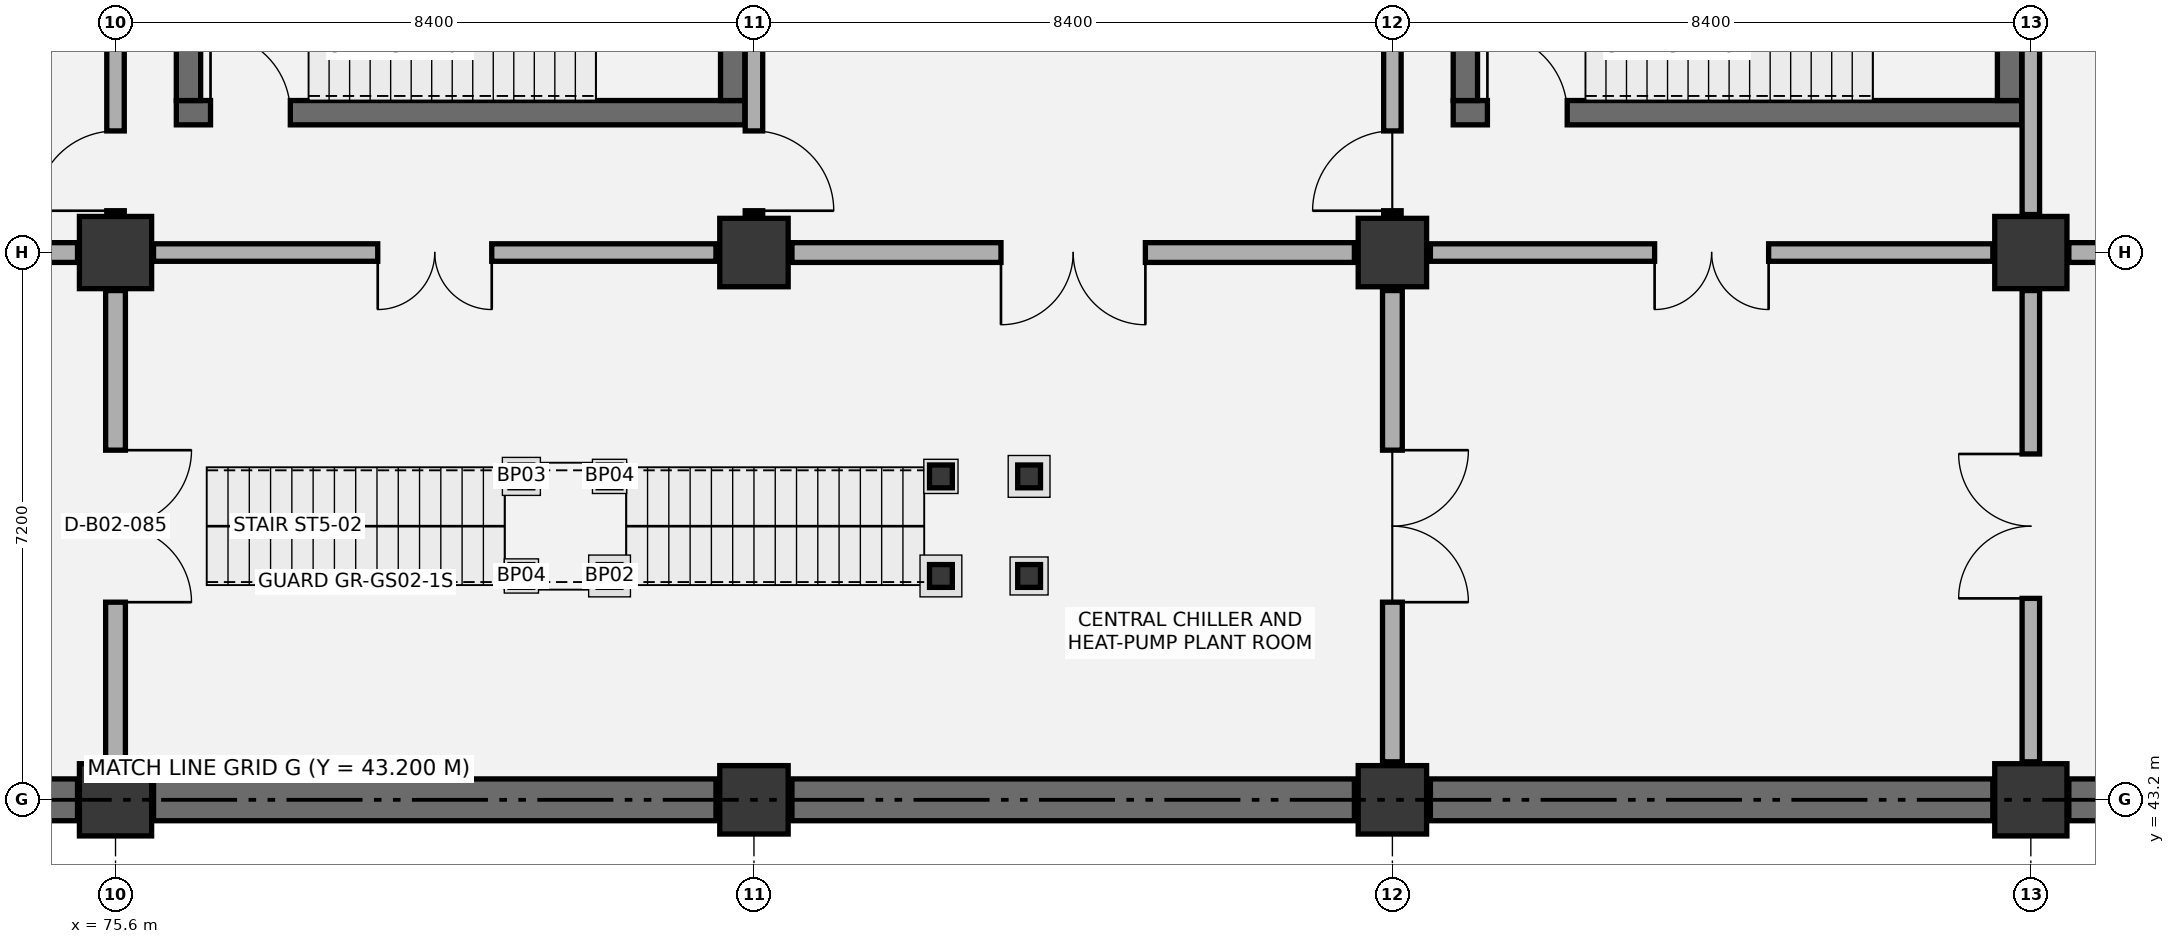
"""IFC4 building model, lengths in metres.
Left out: names, types, materials, properties, quantities, classifications, styles, units other than length and angle.
Written with IfcOpenShell. Run it as: python <this file> out.ifc"""

import sys

from ifc_helpers import new_model, si_unit, direction, frame, frame_2d, origin, origin_2d, place, context, subcontext, project, spatial, rectangle, i_section, extrude, element, fill, save


model = new_model("IFC4")
c1 = context("Model", 3, precision=1e-05, world=origin(), true_north=direction((0.0, 1.0)))
c2 = subcontext(c1, "Body", "Model", "MODEL_VIEW")
j1 = project(units=[si_unit("LENGTHUNIT", "METRE"), si_unit("PLANEANGLEUNIT", "RADIAN")], contexts=[c1])
p1 = place(None, origin())
s1 = spatial("IfcSite", under=j1, at=p1, CompositionType="ELEMENT")
p2 = place(p1, origin())
s2 = spatial("IfcBuilding", under=s1, at=p2, CompositionType="ELEMENT")
p3 = place(p2, frame((0.0, 0.0, -9.6)))
s3 = spatial("IfcBuildingStorey", under=s2, at=p3, CompositionType="ELEMENT", Elevation=-9.6)
for number, where, z_axis, x_axis in (
    (1, (75.6, 43.2, 0.0), (0.0, 0.0, 1.0), (1.0, 0.0, 0.0)),
    (2, (75.6, 50.4, 0.0), (0.0, 0.0, 1.0), (1.0, 0.0, 0.0)),
):
    element("IfcColumn", number, at=place(p3, frame(where, z_axis=z_axis, x_axis=x_axis)), inside=s3, PredefinedType="COLUMN", context=c2, shape_type="SweptSolid", body=[
        extrude(rectangle(XDim=0.95, YDim=0.95, at=origin_2d()), origin(), (0.0, 0.0, 1.0), 4.8),
    ])
for number, where, z_axis, x_axis in (
    (3, (84.0, 43.2, 0.0), (0.0, 0.0, 1.0), (1.0, 0.0, 0.0)),
    (4, (84.0, 50.4, 0.0), (0.0, 0.0, 1.0), (1.0, 0.0, 0.0)),
    (5, (92.4, 43.2, 0.0), (0.0, 0.0, 1.0), (1.0, 0.0, 0.0)),
    (6, (92.4, 50.4, 0.0), (0.0, 0.0, 1.0), (1.0, 0.0, 0.0)),
):
    element("IfcColumn", number, at=place(p3, frame(where, z_axis=z_axis, x_axis=x_axis)), inside=s3, PredefinedType="COLUMN", context=c2, shape_type="SweptSolid", body=[
        extrude(rectangle(XDim=0.9, YDim=0.9, at=origin_2d()), origin(), (0.0, 0.0, 1.0), 4.8),
    ])
for number, where, z_axis, x_axis in (
    (7, (100.8, 43.2, 0.0), (0.0, 0.0, 1.0), (1.0, 0.0, 0.0)),
    (8, (100.8, 50.4, 0.0), (0.0, 0.0, 1.0), (1.0, 0.0, 0.0)),
):
    element("IfcColumn", number, at=place(p3, frame(where, z_axis=z_axis, x_axis=x_axis)), inside=s3, PredefinedType="COLUMN", context=c2, shape_type="SweptSolid", body=[
        extrude(rectangle(XDim=0.95, YDim=0.95, at=origin_2d()), origin(), (0.0, 0.0, 1.0), 4.8),
    ])
for number, where, z_axis, x_axis in (
    (9, (80.94, 46.145, 0.0), (0.0, 0.0, 1.0), (1.0, 0.0, 0.0)),
    (10, (82.1, 46.145, 0.0), (0.0, 0.0, 1.0), (1.0, 0.0, 0.0)),
    (11, (80.94, 47.455, 0.0), (0.0, 0.0, 1.0), (1.0, 0.0, 0.0)),
    (12, (82.1, 47.455, 0.0), (0.0, 0.0, 1.0), (1.0, 0.0, 0.0)),
):
    element("IfcColumn", number, at=place(p3, frame(where, z_axis=z_axis, x_axis=x_axis)), inside=s3, PredefinedType="COLUMN", context=c2, shape_type="SweptSolid", body=[
        extrude(i_section(OverallWidth=0.3, OverallDepth=0.3, WebThickness=0.011, FlangeThickness=0.019, FilletRadius=0.027, at=origin_2d()), origin(), (0.0, 0.0, 1.0), 2.22),
    ])
for number, where, z_axis, x_axis in (
    (13, (86.46, 46.145, 0.0), (0.0, 0.0, 1.0), (1.0, 0.0, 0.0)),
    (14, (87.62, 46.145, 0.0), (0.0, 0.0, 1.0), (1.0, 0.0, 0.0)),
    (15, (86.46, 47.455, 0.0), (0.0, 0.0, 1.0), (1.0, 0.0, 0.0)),
    (16, (87.62, 47.455, 0.0), (0.0, 0.0, 1.0), (1.0, 0.0, 0.0)),
):
    element("IfcColumn", number, at=place(p3, frame(where, z_axis=z_axis, x_axis=x_axis)), inside=s3, PredefinedType="COLUMN", context=c2, shape_type="SweptSolid", body=[
        extrude(i_section(OverallWidth=0.3, OverallDepth=0.3, WebThickness=0.011, FlangeThickness=0.019, FilletRadius=0.027, at=origin_2d()), origin(), (0.0, 0.0, 1.0), 4.6),
    ])
p4 = place(p3, frame((67.7, 43.2, 0.0), z_axis=(0.0, 0.0, 1.0), x_axis=(1.0, 0.0, 0.0)))
e17 = element("IfcWall", 17, at=p4, inside=s3, PredefinedType="USERDEFINED", context=c2, shape_type="SweptSolid", body=[
    extrude(rectangle(XDim=7.4, YDim=0.55, at=frame_2d((3.7, 0.0))), origin(), (0.0, 0.0, 1.0), 4.4),
])
for number, where, z_axis, x_axis in (
    (18, (76.1, 43.2, 0.0), (0.0, 0.0, 1.0), (1.0, 0.0, 0.0)),
    (19, (84.5, 43.2, 0.0), (0.0, 0.0, 1.0), (1.0, 0.0, 0.0)),
):
    element("IfcWall", number, at=place(p3, frame(where, z_axis=z_axis, x_axis=x_axis)), inside=s3, PredefinedType="USERDEFINED", context=c2, shape_type="SweptSolid", body=[
        extrude(rectangle(XDim=7.4, YDim=0.55, at=frame_2d((3.7, 0.0))), origin(), (0.0, 0.0, 1.0), 4.4),
    ])
p5 = place(p3, frame((92.9, 43.2, 0.0), z_axis=(0.0, 0.0, 1.0), x_axis=(1.0, 0.0, 0.0)))
e20 = element("IfcWall", 20, at=p5, inside=s3, PredefinedType="USERDEFINED", context=c2, shape_type="SweptSolid", body=[
    extrude(rectangle(XDim=7.4, YDim=0.55, at=frame_2d((3.7, 0.0))), origin(), (0.0, 0.0, 1.0), 4.4),
])
p6 = place(p3, frame((101.3, 43.2, 0.0), z_axis=(0.0, 0.0, 1.0), x_axis=(1.0, 0.0, 0.0)))
e21 = element("IfcWall", 21, at=p6, inside=s3, PredefinedType="USERDEFINED", context=c2, shape_type="SweptSolid", body=[
    extrude(rectangle(XDim=7.4, YDim=0.55, at=frame_2d((3.7, 0.0))), origin(), (0.0, 0.0, 1.0), 4.4),
])
p7 = place(p3, frame((76.4, 52.24, 0.0), z_axis=(0.0, 0.0, 1.0), x_axis=(1.0, 0.0, 0.0)))
e22 = element("IfcWall", 22, at=p7, inside=s3, PredefinedType="SHEAR", context=c2, shape_type="SweptSolid", body=[
    extrude(rectangle(XDim=7.48, YDim=0.32, at=frame_2d((3.74, 0.0))), origin(), (0.0, 0.0, 1.0), 4.4),
])
p8 = place(p7, frame((0.45, 0.0, 0.0)))
e23 = element("IfcOpeningElement", 23, at=p8, cuts=e22, PredefinedType="OPENING", context=c2, shape_type="SweptSolid", body=[
    extrude(rectangle(XDim=1.05, YDim=2.15, at=frame_2d((0.525, 1.075))), frame((0.0, 0.17, 0.0), z_axis=(0.0, -1.0, 0.0), x_axis=(1.0, 0.0, 0.0)), (0.0, 0.0, 1.0), 0.34),
])
for number, where, z_axis, x_axis in (
    (24, (76.56, 52.4, 0.0), (0.0, 0.0, 1.0), (0.0, 1.0, 0.0)),
    (25, (83.72, 52.4, 0.0), (0.0, 0.0, 1.0), (0.0, 1.0, 0.0)),
):
    element("IfcWall", number, at=place(p3, frame(where, z_axis=z_axis, x_axis=x_axis)), inside=s3, PredefinedType="SHEAR", context=c2, shape_type="SweptSolid", body=[
        extrude(rectangle(XDim=3.8, YDim=0.32, at=frame_2d((1.9, 0.0))), origin(), (0.0, 0.0, 1.0), 4.4),
    ])
p9 = place(p3, frame((93.2, 52.24, 0.0), z_axis=(0.0, 0.0, 1.0), x_axis=(1.0, 0.0, 0.0)))
e26 = element("IfcWall", 26, at=p9, inside=s3, PredefinedType="SHEAR", context=c2, shape_type="SweptSolid", body=[
    extrude(rectangle(XDim=7.48, YDim=0.32, at=frame_2d((3.74, 0.0))), origin(), (0.0, 0.0, 1.0), 4.4),
])
p10 = place(p9, frame((0.45, 0.0, 0.0)))
e27 = element("IfcOpeningElement", 27, at=p10, cuts=e26, PredefinedType="OPENING", context=c2, shape_type="SweptSolid", body=[
    extrude(rectangle(XDim=1.05, YDim=2.15, at=frame_2d((0.525, 1.075))), frame((0.0, 0.17, 0.0), z_axis=(0.0, -1.0, 0.0), x_axis=(1.0, 0.0, 0.0)), (0.0, 0.0, 1.0), 0.34),
])
for number, where, z_axis, x_axis in (
    (28, (93.36, 52.4, 0.0), (0.0, 0.0, 1.0), (0.0, 1.0, 0.0)),
    (29, (100.52, 52.4, 0.0), (0.0, 0.0, 1.0), (0.0, 1.0, 0.0)),
):
    element("IfcWall", number, at=place(p3, frame(where, z_axis=z_axis, x_axis=x_axis)), inside=s3, PredefinedType="SHEAR", context=c2, shape_type="SweptSolid", body=[
        extrude(rectangle(XDim=3.8, YDim=0.32, at=frame_2d((1.9, 0.0))), origin(), (0.0, 0.0, 1.0), 4.4),
    ])
p11 = place(p3, frame((75.6, 43.7, 0.0), z_axis=(0.0, 0.0, 1.0), x_axis=(0.0, 1.0, 0.0)))
e30 = element("IfcWall", 30, at=p11, inside=s3, PredefinedType="PARTITIONING", context=c2, shape_type="SweptSolid", body=[
    extrude(rectangle(XDim=6.2, YDim=0.26, at=frame_2d((3.1, 0.0))), origin(), (0.0, 0.0, 1.0), 3.595),
])
p12 = place(p11, frame((2.1, 0.0, 0.0)))
e31 = element("IfcOpeningElement", 31, at=p12, cuts=e30, PredefinedType="OPENING", context=c2, shape_type="SweptSolid", body=[
    extrude(rectangle(XDim=2.0, YDim=2.35, at=frame_2d((1.0, 1.175))), frame((0.0, 0.14, 0.0), z_axis=(0.0, -1.0, 0.0), x_axis=(1.0, 0.0, 0.0)), (0.0, 0.0, 1.0), 0.28),
])
p13 = place(p3, frame((67.7, 50.4, 0.0), z_axis=(0.0, 0.0, 1.0), x_axis=(1.0, 0.0, 0.0)))
e32 = element("IfcWall", 32, at=p13, inside=s3, PredefinedType="PARTITIONING", context=c2, shape_type="SweptSolid", body=[
    extrude(rectangle(XDim=7.4, YDim=0.26, at=frame_2d((3.7, 0.0))), origin(), (0.0, 0.0, 1.0), 3.495),
])
p14 = place(p13, frame((2.75, 0.0, 0.0)))
e33 = element("IfcOpeningElement", 33, at=p14, cuts=e32, PredefinedType="OPENING", context=c2, shape_type="SweptSolid", body=[
    extrude(rectangle(XDim=1.9, YDim=2.3, at=frame_2d((0.95, 1.15))), frame((0.0, 0.14, 0.0), z_axis=(0.0, -1.0, 0.0), x_axis=(1.0, 0.0, 0.0)), (0.0, 0.0, 1.0), 0.28),
])
p15 = place(p3, frame((75.6, 50.9, 0.0), z_axis=(0.0, 0.0, 1.0), x_axis=(0.0, 1.0, 0.0)))
e34 = element("IfcWall", 34, at=p15, inside=s3, PredefinedType="PARTITIONING", context=c2, shape_type="SweptSolid", body=[
    extrude(rectangle(XDim=6.2, YDim=0.23, at=frame_2d((3.1, 0.0))), origin(), (0.0, 0.0, 1.0), 3.595),
])
p16 = place(p15, frame((0.05, 0.0, 0.0)))
e35 = element("IfcOpeningElement", 35, at=p16, cuts=e34, PredefinedType="OPENING", context=c2, shape_type="SweptSolid", body=[
    extrude(rectangle(XDim=1.05, YDim=2.15, at=frame_2d((0.525, 1.075))), frame((0.0, 0.125, 0.0), z_axis=(0.0, -1.0, 0.0), x_axis=(1.0, 0.0, 0.0)), (0.0, 0.0, 1.0), 0.25),
])
p17 = place(p3, frame((76.1, 50.4, 0.0), z_axis=(0.0, 0.0, 1.0), x_axis=(1.0, 0.0, 0.0)))
e36 = element("IfcWall", 36, at=p17, inside=s3, PredefinedType="PARTITIONING", context=c2, shape_type="SweptSolid", body=[
    extrude(rectangle(XDim=7.4, YDim=0.23, at=frame_2d((3.7, 0.0))), origin(), (0.0, 0.0, 1.0), 3.495),
])
p18 = place(p17, frame((2.95, 0.0, 0.0)))
e37 = element("IfcOpeningElement", 37, at=p18, cuts=e36, PredefinedType="OPENING", context=c2, shape_type="SweptSolid", body=[
    extrude(rectangle(XDim=1.5, YDim=2.15, at=frame_2d((0.75, 1.075))), frame((0.0, 0.125, 0.0), z_axis=(0.0, -1.0, 0.0), x_axis=(1.0, 0.0, 0.0)), (0.0, 0.0, 1.0), 0.25),
])
p19 = place(p3, frame((84.0, 50.9, 0.0), z_axis=(0.0, 0.0, 1.0), x_axis=(0.0, 1.0, 0.0)))
e38 = element("IfcWall", 38, at=p19, inside=s3, PredefinedType="PARTITIONING", context=c2, shape_type="SweptSolid", body=[
    extrude(rectangle(XDim=6.2, YDim=0.23, at=frame_2d((3.1, 0.0))), origin(), (0.0, 0.0, 1.0), 3.595),
])
p20 = place(p19, frame((0.05, 0.0, 0.0)))
e39 = element("IfcOpeningElement", 39, at=p20, cuts=e38, PredefinedType="OPENING", context=c2, shape_type="SweptSolid", body=[
    extrude(rectangle(XDim=1.05, YDim=2.15, at=frame_2d((0.525, 1.075))), frame((0.0, 0.125, 0.0), z_axis=(0.0, -1.0, 0.0), x_axis=(1.0, 0.0, 0.0)), (0.0, 0.0, 1.0), 0.25),
])
p21 = place(p3, frame((92.4, 43.7, 0.0), z_axis=(0.0, 0.0, 1.0), x_axis=(0.0, 1.0, 0.0)))
e40 = element("IfcWall", 40, at=p21, inside=s3, PredefinedType="PARTITIONING", context=c2, shape_type="SweptSolid", body=[
    extrude(rectangle(XDim=6.2, YDim=0.26, at=frame_2d((3.1, 0.0))), origin(), (0.0, 0.0, 1.0), 3.595),
])
p22 = place(p21, frame((2.1, 0.0, 0.0)))
e41 = element("IfcOpeningElement", 41, at=p22, cuts=e40, PredefinedType="OPENING", context=c2, shape_type="SweptSolid", body=[
    extrude(rectangle(XDim=2.0, YDim=2.35, at=frame_2d((1.0, 1.175))), frame((0.0, 0.14, 0.0), z_axis=(0.0, -1.0, 0.0), x_axis=(1.0, 0.0, 0.0)), (0.0, 0.0, 1.0), 0.28),
])
p23 = place(p3, frame((84.5, 50.4, 0.0), z_axis=(0.0, 0.0, 1.0), x_axis=(1.0, 0.0, 0.0)))
e42 = element("IfcWall", 42, at=p23, inside=s3, PredefinedType="PARTITIONING", context=c2, shape_type="SweptSolid", body=[
    extrude(rectangle(XDim=7.4, YDim=0.26, at=frame_2d((3.7, 0.0))), origin(), (0.0, 0.0, 1.0), 3.495),
])
p24 = place(p23, frame((2.75, 0.0, 0.0)))
e43 = element("IfcOpeningElement", 43, at=p24, cuts=e42, PredefinedType="OPENING", context=c2, shape_type="SweptSolid", body=[
    extrude(rectangle(XDim=1.9, YDim=2.3, at=frame_2d((0.95, 1.15))), frame((0.0, 0.14, 0.0), z_axis=(0.0, -1.0, 0.0), x_axis=(1.0, 0.0, 0.0)), (0.0, 0.0, 1.0), 0.28),
])
p25 = place(p3, frame((92.4, 50.9, 0.0), z_axis=(0.0, 0.0, 1.0), x_axis=(0.0, 1.0, 0.0)))
e44 = element("IfcWall", 44, at=p25, inside=s3, PredefinedType="PARTITIONING", context=c2, shape_type="SweptSolid", body=[
    extrude(rectangle(XDim=6.2, YDim=0.23, at=frame_2d((3.1, 0.0))), origin(), (0.0, 0.0, 1.0), 3.595),
])
p26 = place(p25, frame((0.05, 0.0, 0.0)))
e45 = element("IfcOpeningElement", 45, at=p26, cuts=e44, PredefinedType="OPENING", context=c2, shape_type="SweptSolid", body=[
    extrude(rectangle(XDim=1.05, YDim=2.15, at=frame_2d((0.525, 1.075))), frame((0.0, 0.125, 0.0), z_axis=(0.0, -1.0, 0.0), x_axis=(1.0, 0.0, 0.0)), (0.0, 0.0, 1.0), 0.25),
])
p27 = place(p3, frame((100.8, 43.7, 0.0), z_axis=(0.0, 0.0, 1.0), x_axis=(0.0, 1.0, 0.0)))
e46 = element("IfcWall", 46, at=p27, inside=s3, PredefinedType="PARTITIONING", context=c2, shape_type="SweptSolid", body=[
    extrude(rectangle(XDim=6.2, YDim=0.23, at=frame_2d((3.1, 0.0))), origin(), (0.0, 0.0, 1.0), 3.595),
])
p28 = place(p27, frame((2.15, 0.0, 0.0)))
e47 = element("IfcOpeningElement", 47, at=p28, cuts=e46, PredefinedType="OPENING", context=c2, shape_type="SweptSolid", body=[
    extrude(rectangle(XDim=1.9, YDim=2.3, at=frame_2d((0.95, 1.15))), frame((0.0, 0.125, 0.0), z_axis=(0.0, -1.0, 0.0), x_axis=(1.0, 0.0, 0.0)), (0.0, 0.0, 1.0), 0.25),
])
p29 = place(p3, frame((92.9, 50.4, 0.0), z_axis=(0.0, 0.0, 1.0), x_axis=(1.0, 0.0, 0.0)))
e48 = element("IfcWall", 48, at=p29, inside=s3, PredefinedType="PARTITIONING", context=c2, shape_type="SweptSolid", body=[
    extrude(rectangle(XDim=7.4, YDim=0.23, at=frame_2d((3.7, 0.0))), origin(), (0.0, 0.0, 1.0), 3.495),
])
p30 = place(p29, frame((2.95, 0.0, 0.0)))
e49 = element("IfcOpeningElement", 49, at=p30, cuts=e48, PredefinedType="OPENING", context=c2, shape_type="SweptSolid", body=[
    extrude(rectangle(XDim=1.5, YDim=2.15, at=frame_2d((0.75, 1.075))), frame((0.0, 0.125, 0.0), z_axis=(0.0, -1.0, 0.0), x_axis=(1.0, 0.0, 0.0)), (0.0, 0.0, 1.0), 0.25),
])
p31 = place(p3, frame((100.8, 50.9, 0.0), z_axis=(0.0, 0.0, 1.0), x_axis=(0.0, 1.0, 0.0)))
e50 = element("IfcWall", 50, at=p31, inside=s3, PredefinedType="PARTITIONING", context=c2, shape_type="SweptSolid", body=[
    extrude(rectangle(XDim=6.2, YDim=0.23, at=frame_2d((3.1, 0.0))), origin(), (0.0, 0.0, 1.0), 3.595),
])
p32 = place(p3, frame((101.3, 50.4, 0.0), z_axis=(0.0, 0.0, 1.0), x_axis=(1.0, 0.0, 0.0)))
e51 = element("IfcWall", 51, at=p32, inside=s3, PredefinedType="PARTITIONING", context=c2, shape_type="SweptSolid", body=[
    extrude(rectangle(XDim=7.4, YDim=0.26, at=frame_2d((3.7, 0.0))), origin(), (0.0, 0.0, 1.0), 3.495),
])
p33 = place(p32, frame((2.75, 0.0, 0.0)))
e52 = element("IfcOpeningElement", 52, at=p33, cuts=e51, PredefinedType="OPENING", context=c2, shape_type="SweptSolid", body=[
    extrude(rectangle(XDim=1.9, YDim=2.3, at=frame_2d((0.95, 1.15))), frame((0.0, 0.14, 0.0), z_axis=(0.0, -1.0, 0.0), x_axis=(1.0, 0.0, 0.0)), (0.0, 0.0, 1.0), 0.28),
])
p34 = place(p8, origin())
e53 = element("IfcDoor", 53, at=p34, inside=s3, OperationType="SINGLE_SWING_LEFT", PredefinedType="DOOR", context=c2, shape_type="SweptSolid", body=[
    extrude(rectangle(XDim=1.05, YDim=2.15, at=frame_2d((0.525, 1.075))), frame((0.0, 0.025, 0.0), z_axis=(0.0, -1.0, 0.0), x_axis=(1.0, 0.0, 0.0)), (0.0, 0.0, 1.0), 0.05),
])
fill(e23, e53)
p35 = place(p10, origin())
e54 = element("IfcDoor", 54, at=p35, inside=s3, OperationType="SINGLE_SWING_LEFT", PredefinedType="DOOR", context=c2, shape_type="SweptSolid", body=[
    extrude(rectangle(XDim=1.05, YDim=2.15, at=frame_2d((0.525, 1.075))), frame((0.0, 0.025, 0.0), z_axis=(0.0, -1.0, 0.0), x_axis=(1.0, 0.0, 0.0)), (0.0, 0.0, 1.0), 0.05),
])
fill(e27, e54)
p36 = place(p12, frame((2.0, 0.0, 0.0), z_axis=(0.0, 0.0, 1.0), x_axis=(-1.0, 0.0, 0.0)))
e55 = element("IfcDoor", 55, at=p36, inside=s3, OperationType="DOUBLE_DOOR_SINGLE_SWING", PredefinedType="DOOR", context=c2, shape_type="SweptSolid", body=[
    extrude(rectangle(XDim=2.0, YDim=2.35, at=frame_2d((1.0, 1.175))), frame((0.0, 0.025, 0.0), z_axis=(0.0, -1.0, 0.0), x_axis=(1.0, 0.0, 0.0)), (0.0, 0.0, 1.0), 0.05),
])
fill(e31, e55)
p37 = place(p16, origin())
e56 = element("IfcDoor", 56, at=p37, inside=s3, OperationType="SINGLE_SWING_LEFT", PredefinedType="DOOR", context=c2, shape_type="SweptSolid", body=[
    extrude(rectangle(XDim=1.05, YDim=2.15, at=frame_2d((0.525, 1.075))), frame((0.0, 0.025, 0.0), z_axis=(0.0, -1.0, 0.0), x_axis=(1.0, 0.0, 0.0)), (0.0, 0.0, 1.0), 0.05),
])
fill(e35, e56)
p38 = place(p18, frame((1.5, 0.0, 0.0), z_axis=(0.0, 0.0, 1.0), x_axis=(-1.0, 0.0, 0.0)))
e57 = element("IfcDoor", 57, at=p38, inside=s3, OperationType="DOUBLE_DOOR_SINGLE_SWING", PredefinedType="DOOR", context=c2, shape_type="SweptSolid", body=[
    extrude(rectangle(XDim=1.5, YDim=2.15, at=frame_2d((0.75, 1.075))), frame((0.0, 0.025, 0.0), z_axis=(0.0, -1.0, 0.0), x_axis=(1.0, 0.0, 0.0)), (0.0, 0.0, 1.0), 0.05),
])
fill(e37, e57)
p39 = place(p20, frame((1.05, 0.0, 0.0), z_axis=(0.0, 0.0, 1.0), x_axis=(-1.0, 0.0, 0.0)))
e58 = element("IfcDoor", 58, at=p39, inside=s3, OperationType="SINGLE_SWING_RIGHT", PredefinedType="DOOR", context=c2, shape_type="SweptSolid", body=[
    extrude(rectangle(XDim=1.05, YDim=2.15, at=frame_2d((0.525, 1.075))), frame((0.0, 0.025, 0.0), z_axis=(0.0, -1.0, 0.0), x_axis=(1.0, 0.0, 0.0)), (0.0, 0.0, 1.0), 0.05),
])
fill(e39, e58)
p40 = place(p22, frame((2.0, 0.0, 0.0), z_axis=(0.0, 0.0, 1.0), x_axis=(-1.0, 0.0, 0.0)))
e59 = element("IfcDoor", 59, at=p40, inside=s3, OperationType="DOUBLE_DOOR_SINGLE_SWING", PredefinedType="DOOR", context=c2, shape_type="SweptSolid", body=[
    extrude(rectangle(XDim=2.0, YDim=2.35, at=frame_2d((1.0, 1.175))), frame((0.0, 0.025, 0.0), z_axis=(0.0, -1.0, 0.0), x_axis=(1.0, 0.0, 0.0)), (0.0, 0.0, 1.0), 0.05),
])
fill(e41, e59)
p41 = place(p24, frame((1.9, 0.0, 0.0), z_axis=(0.0, 0.0, 1.0), x_axis=(-1.0, 0.0, 0.0)))
e60 = element("IfcDoor", 60, at=p41, inside=s3, OperationType="DOUBLE_DOOR_SINGLE_SWING", PredefinedType="DOOR", context=c2, shape_type="SweptSolid", body=[
    extrude(rectangle(XDim=1.9, YDim=2.3, at=frame_2d((0.95, 1.15))), frame((0.0, 0.025, 0.0), z_axis=(0.0, -1.0, 0.0), x_axis=(1.0, 0.0, 0.0)), (0.0, 0.0, 1.0), 0.05),
])
fill(e43, e60)
p42 = place(p26, origin())
e61 = element("IfcDoor", 61, at=p42, inside=s3, OperationType="SINGLE_SWING_LEFT", PredefinedType="DOOR", context=c2, shape_type="SweptSolid", body=[
    extrude(rectangle(XDim=1.05, YDim=2.15, at=frame_2d((0.525, 1.075))), frame((0.0, 0.025, 0.0), z_axis=(0.0, -1.0, 0.0), x_axis=(1.0, 0.0, 0.0)), (0.0, 0.0, 1.0), 0.05),
])
fill(e45, e61)
p43 = place(p28, origin())
e62 = element("IfcDoor", 62, at=p43, inside=s3, OperationType="DOUBLE_DOOR_SINGLE_SWING", PredefinedType="DOOR", context=c2, shape_type="SweptSolid", body=[
    extrude(rectangle(XDim=1.9, YDim=2.3, at=frame_2d((0.95, 1.15))), frame((0.0, 0.025, 0.0), z_axis=(0.0, -1.0, 0.0), x_axis=(1.0, 0.0, 0.0)), (0.0, 0.0, 1.0), 0.05),
])
fill(e47, e62)
p44 = place(p30, frame((1.5, 0.0, 0.0), z_axis=(0.0, 0.0, 1.0), x_axis=(-1.0, 0.0, 0.0)))
e63 = element("IfcDoor", 63, at=p44, inside=s3, OperationType="DOUBLE_DOOR_SINGLE_SWING", PredefinedType="DOOR", context=c2, shape_type="SweptSolid", body=[
    extrude(rectangle(XDim=1.5, YDim=2.15, at=frame_2d((0.75, 1.075))), frame((0.0, 0.025, 0.0), z_axis=(0.0, -1.0, 0.0), x_axis=(1.0, 0.0, 0.0)), (0.0, 0.0, 1.0), 0.05),
])
fill(e49, e63)
save(model, sys.argv[1])
